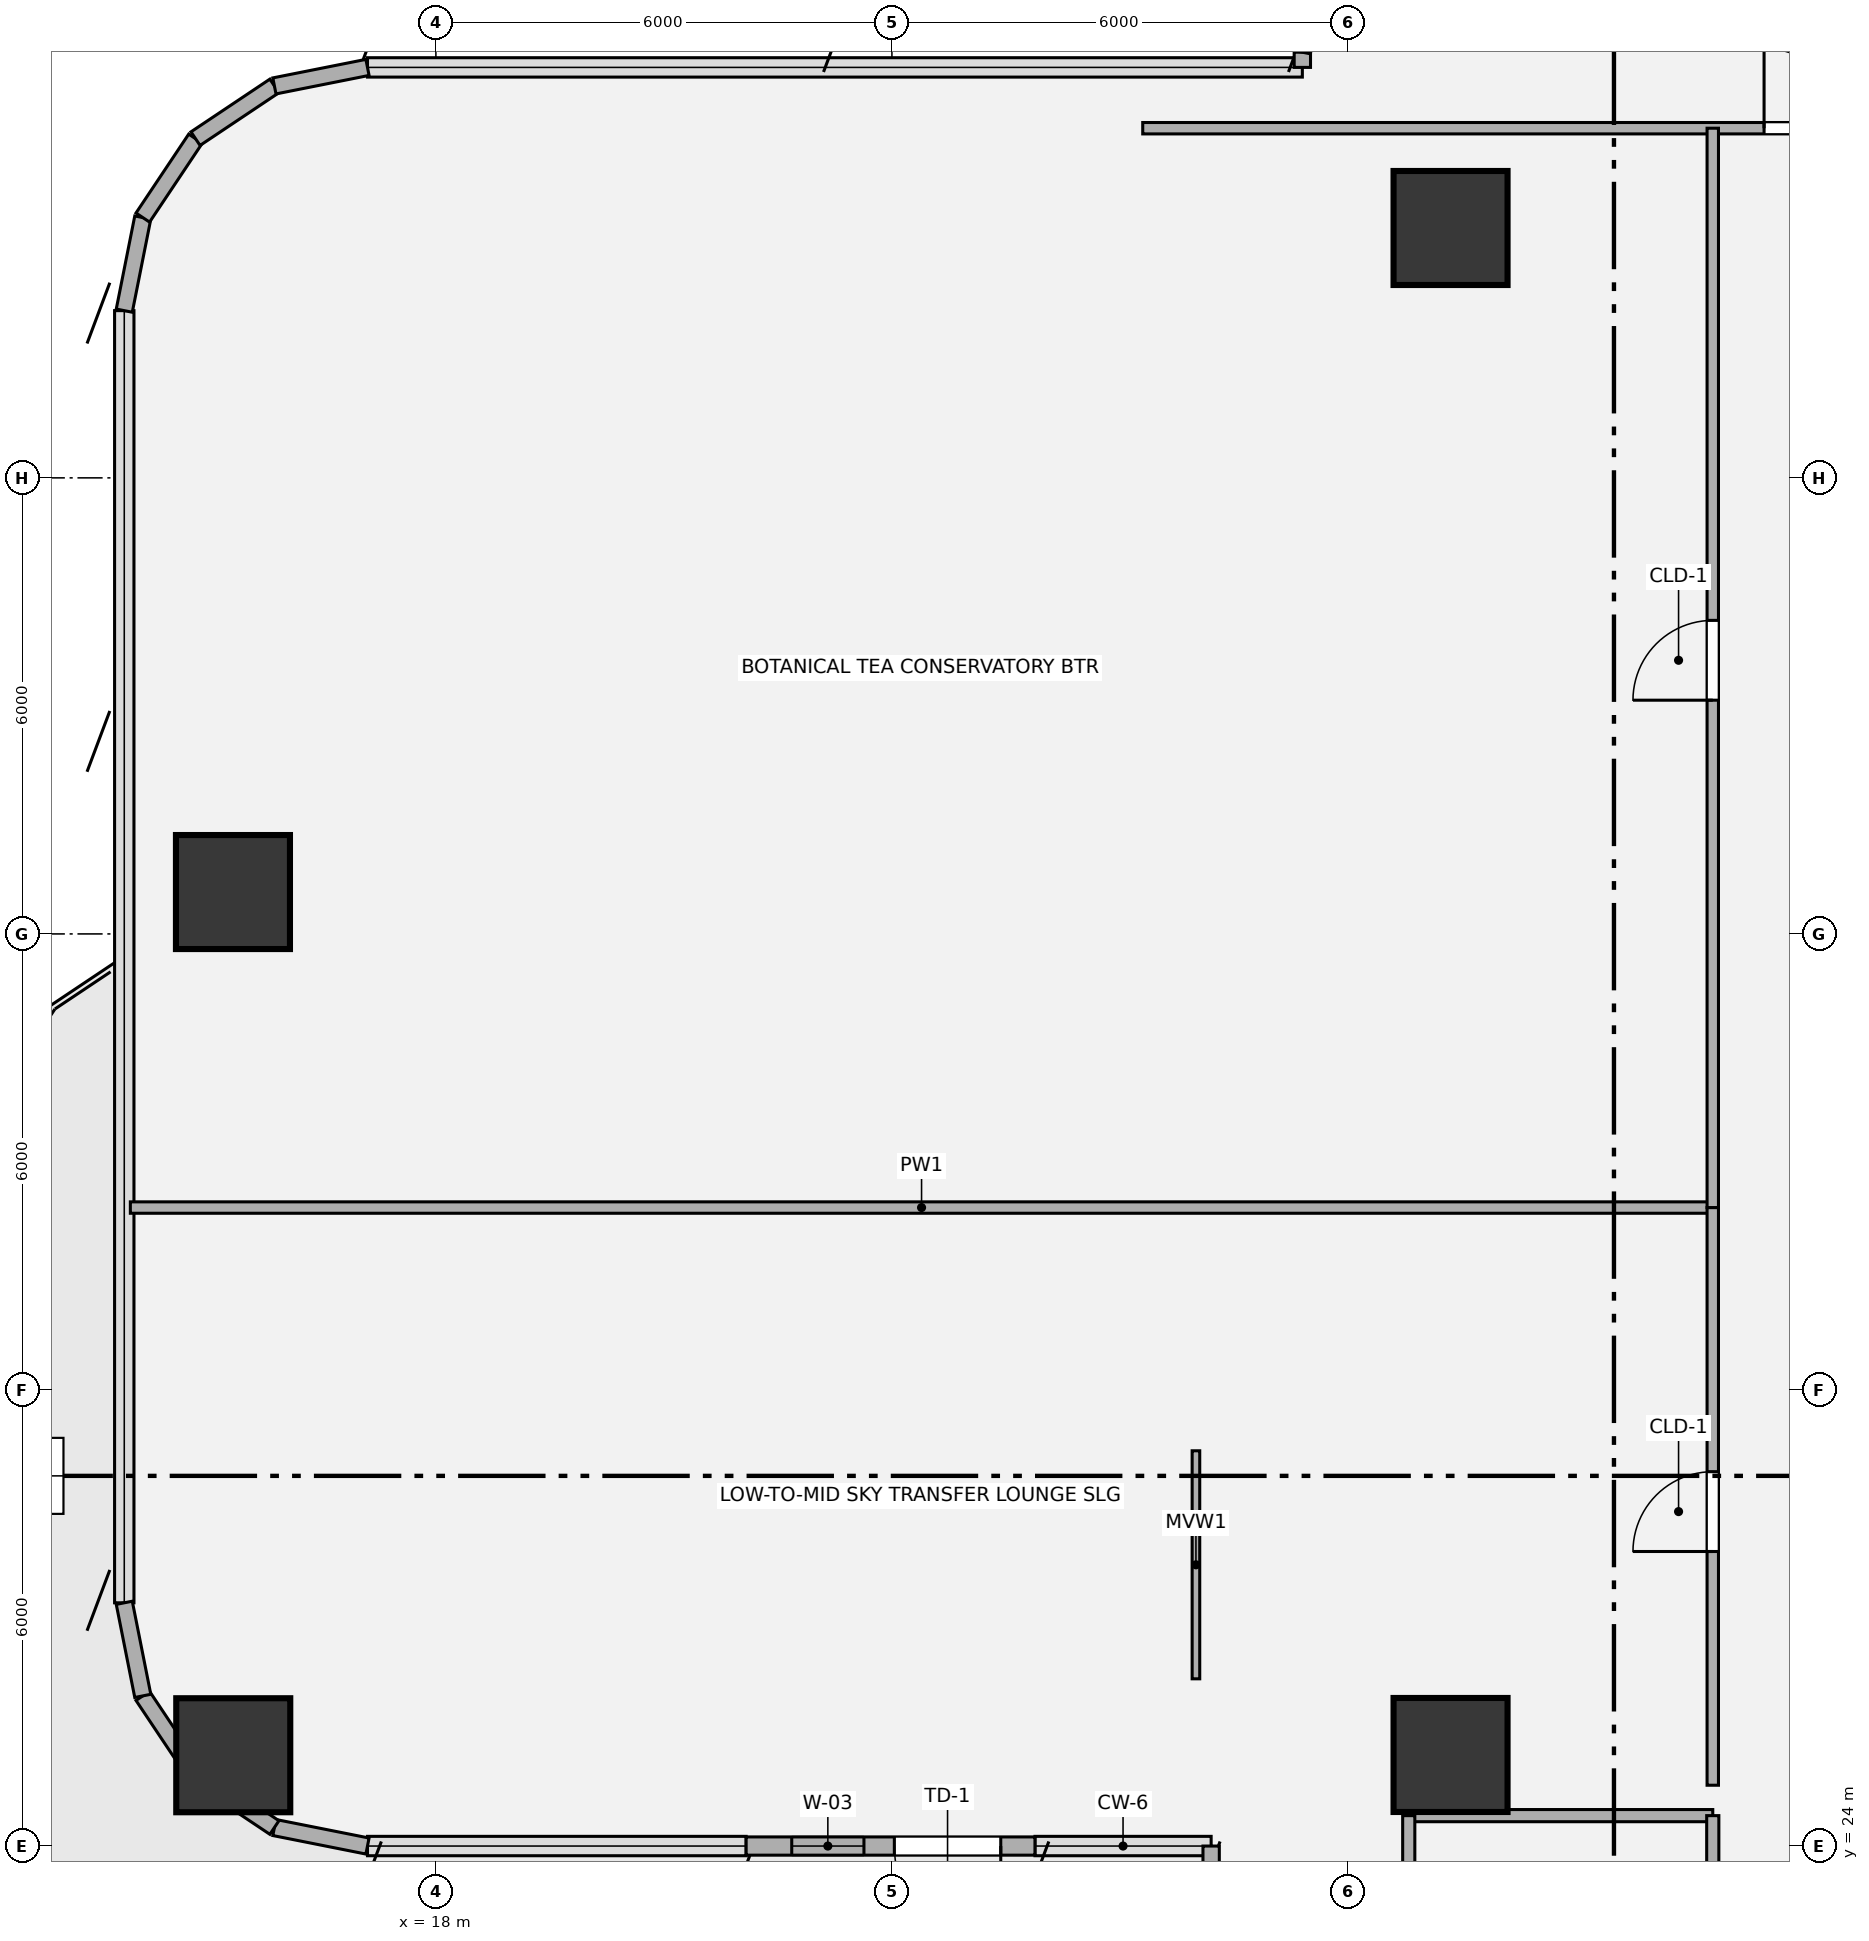
"""IFC4 building model, lengths in metres.
Left out: names, types, materials, properties, quantities, classifications, styles, units other than length and angle.
Written with IfcOpenShell. Run it as: python <this file> out.ifc"""

import sys

from ifc_helpers import new_model, si_unit, direction, frame, frame_2d, origin, origin_2d, place, context, subcontext, project, spatial, rectangle, hollow_circle, extrude, source, transform, mapped, element, fill, save


model = new_model("IFC4")
c1 = context("Model", 3, precision=1e-05, world=origin(), true_north=direction((0.0, 1.0)))
c2 = subcontext(c1, "Body", "Model", "MODEL_VIEW")
j1 = project(units=[si_unit("LENGTHUNIT", "METRE"), si_unit("PLANEANGLEUNIT", "RADIAN")], contexts=[c1])
p1 = place(None, origin())
s1 = spatial("IfcSite", under=j1, at=p1, CompositionType="ELEMENT")
p2 = place(p1, origin())
s2 = spatial("IfcBuilding", under=s1, at=p2, CompositionType="ELEMENT")
p3 = place(p2, frame((0.0, 0.0, 85.32)))
s3 = spatial("IfcBuildingStorey", under=s2, at=p3, CompositionType="ELEMENT", Elevation=85.32)
m1 = source(origin(), c2, "Body", "SweptSolid", [
    extrude(hollow_circle(Radius=0.75, WallThickness=0.05, at=origin_2d()), origin(), (0.0, 0.0, 1.0), 4.532),
])
p4 = place(p3, frame((14.986, 23.877, 0.0), z_axis=(0.153353359402, 0.581256094592, 0.799139599607), x_axis=(-0.966914173201, 0.255101904467, 0.0)))
e1 = element("IfcColumn", 1, at=p4, inside=s3, PredefinedType="COLUMN", context=c2, shape_type="MappedRepresentation", body=[
    mapped(m1, transform((0.0, 0.0, 0.0), x_axis=(1.0, 0.0, 0.0), y_axis=(0.0, 1.0, 0.0), z_axis=(0.0, 0.0, 1.0), scale=1.0)),
])
m2 = source(origin(), c2, "Body", "SweptSolid", [
    extrude(hollow_circle(Radius=0.75, WallThickness=0.05, at=origin_2d()), origin(), (0.0, 0.0, 1.0), 4.746),
])
p5 = place(p3, frame((14.986, 35.032, 0.0), z_axis=(0.144802699262, 0.640166817875, 0.754465786884), x_axis=(-0.975359457824, 0.220621685317, 0.0)))
e2 = element("IfcColumn", 2, at=p5, inside=s3, PredefinedType="COLUMN", context=c2, shape_type="MappedRepresentation", body=[
    mapped(m2, transform((0.0, 0.0, 0.0), x_axis=(1.0, 0.0, 0.0), y_axis=(0.0, 1.0, 0.0), z_axis=(0.0, 0.0, 1.0), scale=1.0)),
])
m3 = source(origin(), c2, "Body", "SweptSolid", [
    extrude(hollow_circle(Radius=0.75, WallThickness=0.05, at=origin_2d()), origin(), (0.0, 0.0, 1.0), 4.491),
])
p6 = place(p3, frame((31.35, 23.877, 0.0), z_axis=(0.0, 0.58821048592, 0.808707873248), x_axis=(-1.0, 0.0, 0.0)))
e3 = element("IfcColumn", 3, at=p6, inside=s3, PredefinedType="COLUMN", context=c2, shape_type="MappedRepresentation", body=[
    mapped(m3, transform((0.0, 0.0, 0.0), x_axis=(1.0, 0.0, 0.0), y_axis=(0.0, 1.0, 0.0), z_axis=(0.0, 0.0, 1.0), scale=1.0)),
])
m4 = source(origin(), c2, "Body", "SweptSolid", [
    extrude(hollow_circle(Radius=0.75, WallThickness=0.05, at=origin_2d()), origin(), (0.0, 0.0, 1.0), 5.348),
])
p7 = place(p3, frame((31.35, 43.268, 0.0), z_axis=(0.0, 0.75502895514, 0.655691449464), x_axis=(-1.0, 0.0, 0.0)))
e4 = element("IfcColumn", 4, at=p7, inside=s3, PredefinedType="COLUMN", context=c2, shape_type="MappedRepresentation", body=[
    mapped(m4, transform((0.0, 0.0, 0.0), x_axis=(1.0, 0.0, 0.0), y_axis=(0.0, 1.0, 0.0), z_axis=(0.0, 0.0, 1.0), scale=1.0)),
])
p8 = place(p3, frame((28.2, 21.4, 0.0), z_axis=(0.0, 0.0, 1.0), x_axis=(0.0, 1.0, 0.0)))
e5 = element("IfcWall", 5, at=p8, inside=s3, PredefinedType="SOLIDWALL", context=c2, shape_type="SweptSolid", body=[
    extrude(rectangle(XDim=2.6, YDim=0.215, at=frame_2d((1.3, 0.0))), origin(), (0.0, 0.0, 1.0), 4.092),
])
p9 = place(p3, frame((25.882, 24.0, 0.0), z_axis=(0.0, 0.0, 1.0), x_axis=(-1.0, 0.0, 0.0)))
e6 = element("IfcWall", 6, at=p9, inside=s3, PredefinedType="SOLIDWALL", context=c2, shape_type="SweptSolid", body=[
    extrude(rectangle(XDim=3.8, YDim=0.24, at=frame_2d((1.9, 0.0))), origin(), (0.0, 0.0, 1.0), 4.092),
])
p10 = place(p9, frame((0.45, 0.0, 0.0)))
e7 = element("IfcOpeningElement", 7, at=p10, cuts=e6, PredefinedType="OPENING", context=c2, shape_type="SweptSolid", body=[
    extrude(rectangle(XDim=1.4, YDim=2.15, at=origin_2d()), frame((0.7, 0.13, 1.075), z_axis=(0.0, -1.0, 0.0), x_axis=(1.0, 0.0, 0.0)), (0.0, 0.0, 1.0), 0.26),
])
p11 = place(p9, frame((2.25, 0.0, 0.85)))
e8 = element("IfcOpeningElement", 8, at=p11, cuts=e6, PredefinedType="OPENING", context=c2, shape_type="SweptSolid", body=[
    extrude(rectangle(XDim=0.95, YDim=1.35, at=origin_2d()), frame((0.475, 0.13, 0.675), z_axis=(0.0, -1.0, 0.0), x_axis=(1.0, 0.0, 0.0)), (0.0, 0.0, 1.0), 0.26),
])
for number, where, z_axis, x_axis in (
    (9, (17.1, 24.0, 0.0), (0.0, 0.0, 1.0), (-0.981, 0.195, 0.0)),
    (10, (15.875, 24.244, 0.0), (0.0, 0.0, 1.0), (-0.831, 0.556, 0.0)),
    (11, (14.837, 24.937, 0.0), (0.0, 0.0, 1.0), (-0.556, 0.831, 0.0)),
    (12, (14.144, 25.975, 0.0), (0.0, 0.0, 1.0), (-0.195, 0.981, 0.0)),
    (13, (13.9, 44.2, 0.0), (0.0, 0.0, 1.0), (0.195, 0.981, 0.0)),
    (14, (14.144, 45.425, 0.0), (0.0, 0.0, 1.0), (0.556, 0.831, 0.0)),
    (15, (14.837, 46.463, 0.0), (0.0, 0.0, 1.0), (0.831, 0.556, 0.0)),
    (16, (15.875, 47.156, 0.0), (0.0, 0.0, 1.0), (0.981, 0.195, 0.0)),
):
    element("IfcWall", number, at=place(p3, frame(where, z_axis=z_axis, x_axis=x_axis)), inside=s3, PredefinedType="SOLIDWALL", context=c2, shape_type="SweptSolid", body=[
        extrude(rectangle(XDim=1.249, YDim=0.215, at=frame_2d((0.624, 0.0))), origin(), (0.0, 0.0, 1.0), 4.092),
    ])
p12 = place(p3, frame((29.4, 47.4, 0.0), z_axis=(0.0, 0.0, 1.0), x_axis=(0.0, 1.0, 0.0)))
e17 = element("IfcWall", 17, at=p12, inside=s3, PredefinedType="SOLIDWALL", context=c2, shape_type="SweptSolid", body=[
    extrude(rectangle(XDim=0.2, YDim=0.215, at=frame_2d((0.1, 0.0))), origin(), (0.0, 0.0, 1.0), 4.092),
])
p13 = place(p3, frame((29.4, 47.6, 0.0), z_axis=(0.0, 0.0, 1.0), x_axis=(0.195127417394, 0.980777900945, 0.0)))
e18 = element("IfcWall", 18, at=p13, inside=s3, PredefinedType="SOLIDWALL", context=c2, shape_type="SweptSolid", body=[
    extrude(rectangle(XDim=1.092, YDim=0.215, at=frame_2d((0.546, 0.0))), origin(), (0.0, 0.0, 1.0), 4.092),
])
p14 = place(p3, frame((30.8, 24.4, 0.0), z_axis=(0.0, 0.0, 1.0), x_axis=(1.0, 0.0, 0.0)))
e19 = element("IfcWall", 19, at=p14, inside=s3, PredefinedType="PLUMBINGWALL", context=c2, shape_type="SweptSolid", body=[
    extrude(rectangle(XDim=4.0, YDim=0.16, at=frame_2d((2.0, 0.0))), origin(), (0.0, 0.0, 1.0), 4.062),
])
p15 = place(p3, frame((13.98, 32.4, 0.0), z_axis=(0.0, 0.0, 1.0), x_axis=(1.0, 0.0, 0.0)))
e20 = element("IfcWall", 20, at=p15, inside=s3, PredefinedType="PARTITIONING", context=c2, shape_type="SweptSolid", body=[
    extrude(rectangle(XDim=20.82, YDim=0.15, at=frame_2d((10.41, 0.0))), origin(), (0.0, 0.0, 1.0), 3.617),
])
p16 = place(p3, frame((27.3, 46.6, 0.0), z_axis=(0.0, 0.0, 1.0), x_axis=(1.0, 0.0, 0.0)))
e21 = element("IfcWall", 21, at=p16, inside=s3, PredefinedType="PARTITIONING", context=c2, shape_type="SweptSolid", body=[
    extrude(rectangle(XDim=17.4, YDim=0.15, at=frame_2d((8.7, 0.0))), origin(), (0.0, 0.0, 1.0), 3.87),
])
p17 = place(p16, frame((8.175, 0.0, 0.0)))
e22 = element("IfcOpeningElement", 22, at=p17, cuts=e21, PredefinedType="OPENING", context=c2, shape_type="SweptSolid", body=[
    extrude(rectangle(XDim=1.05, YDim=2.1, at=origin_2d()), frame((0.525, 0.085, 1.05), z_axis=(0.0, -1.0, 0.0), x_axis=(1.0, 0.0, 0.0)), (0.0, 0.0, 1.0), 0.17),
])
p18 = place(p3, frame((30.8, 20.8, 0.0), z_axis=(0.0, 0.0, 1.0), x_axis=(0.0, 1.0, 0.0)))
e23 = element("IfcWall", 23, at=p18, inside=s3, PredefinedType="PLUMBINGWALL", context=c2, shape_type="SweptSolid", body=[
    extrude(rectangle(XDim=3.6, YDim=0.16, at=frame_2d((1.8, 0.0))), origin(), (0.0, 0.0, 1.0), 2.277),
])
p19 = place(p3, frame((34.8, 20.8, 0.0), z_axis=(0.0, 0.0, 1.0), x_axis=(0.0, 1.0, 0.0)))
e24 = element("IfcWall", 24, at=p19, inside=s3, PredefinedType="PLUMBINGWALL", context=c2, shape_type="SweptSolid", body=[
    extrude(rectangle(XDim=3.6, YDim=0.16, at=frame_2d((1.8, 0.0))), origin(), (0.0, 0.0, 1.0), 4.062),
])
p20 = place(p19, frame((1.37, 0.0, 0.0)))
e25 = element("IfcOpeningElement", 25, at=p20, cuts=e24, PredefinedType="OPENING", context=c2, shape_type="SweptSolid", body=[
    extrude(rectangle(XDim=0.86, YDim=2.1, at=origin_2d()), frame((0.43, 0.09, 1.05), z_axis=(0.0, -1.0, 0.0), x_axis=(1.0, 0.0, 0.0)), (0.0, 0.0, 1.0), 0.18),
])
p21 = place(p3, frame((34.8, 24.8, 0.0), z_axis=(0.0, 0.0, 1.0), x_axis=(0.0, 1.0, 0.0)))
e26 = element("IfcWall", 26, at=p21, inside=s3, PredefinedType="PARTITIONING", context=c2, shape_type="SweptSolid", body=[
    extrude(rectangle(XDim=7.6, YDim=0.15, at=frame_2d((3.8, 0.0))), origin(), (0.0, 0.0, 1.0), 4.062),
])
p22 = place(p21, frame((3.075, 0.0, 0.0)))
e27 = element("IfcOpeningElement", 27, at=p22, cuts=e26, PredefinedType="OPENING", context=c2, shape_type="SweptSolid", body=[
    extrude(rectangle(XDim=1.05, YDim=2.1, at=origin_2d()), frame((0.525, 0.085, 1.05), z_axis=(0.0, -1.0, 0.0), x_axis=(1.0, 0.0, 0.0)), (0.0, 0.0, 1.0), 0.17),
])
p23 = place(p3, frame((34.8, 32.4, 0.0), z_axis=(0.0, 0.0, 1.0), x_axis=(0.0, 1.0, 0.0)))
e28 = element("IfcWall", 28, at=p23, inside=s3, PredefinedType="PARTITIONING", context=c2, shape_type="SweptSolid", body=[
    extrude(rectangle(XDim=14.2, YDim=0.15, at=frame_2d((7.1, 0.0))), origin(), (0.0, 0.0, 1.0), 4.062),
])
p24 = place(p23, frame((6.675, 0.0, 0.0)))
e29 = element("IfcOpeningElement", 29, at=p24, cuts=e28, PredefinedType="OPENING", context=c2, shape_type="SweptSolid", body=[
    extrude(rectangle(XDim=1.05, YDim=2.1, at=origin_2d()), frame((0.525, 0.085, 1.05), z_axis=(0.0, -1.0, 0.0), x_axis=(1.0, 0.0, 0.0)), (0.0, 0.0, 1.0), 0.17),
])
p25 = place(p3, frame((28.0, 26.2, 0.0), z_axis=(0.0, 0.0, 1.0), x_axis=(0.0, 1.0, 0.0)))
e30 = element("IfcWall", 30, at=p25, inside=s3, PredefinedType="MOVABLE", context=c2, shape_type="SweptSolid", body=[
    extrude(rectangle(XDim=3.0, YDim=0.1, at=frame_2d((1.5, 0.0))), origin(), (0.0, 0.0, 1.0), 2.85),
])
m5 = source(origin(), c2, "Body", "SweptSolid", [
    extrude(rectangle(XDim=1.4, YDim=2.15, at=origin_2d()), frame((0.7, 0.025, 1.075), z_axis=(0.0, -1.0, 0.0), x_axis=(1.0, 0.0, 0.0)), (0.0, 0.0, 1.0), 0.05),
])
p26 = place(p10, origin())
e31 = element("IfcDoor", 31, at=p26, inside=s3, OperationType="SINGLE_SWING_LEFT", PredefinedType="DOOR", context=c2, shape_type="MappedRepresentation", body=[
    mapped(m5, transform((0.0, 0.0, 0.0), x_axis=(1.0, 0.0, 0.0), y_axis=(0.0, 1.0, 0.0), z_axis=(0.0, 0.0, 1.0), scale=1.0)),
])
fill(e7, e31)
m6 = source(origin(), c2, "Body", "SweptSolid", [
    extrude(rectangle(XDim=0.95, YDim=1.35, at=origin_2d()), frame((0.475, 0.03, 0.675), z_axis=(0.0, -1.0, 0.0), x_axis=(1.0, 0.0, 0.0)), (0.0, 0.0, 1.0), 0.06),
])
p27 = place(p11, origin())
e32 = element("IfcWindow", 32, at=p27, inside=s3, PartitioningType="SINGLE_PANEL", PredefinedType="WINDOW", context=c2, shape_type="MappedRepresentation", body=[
    mapped(m6, transform((0.0, 0.0, 0.0), x_axis=(1.0, 0.0, 0.0), y_axis=(0.0, 1.0, 0.0), z_axis=(0.0, 0.0, 1.0), scale=1.0)),
])
fill(e8, e32)
m7 = source(origin(), c2, "Body", "SweptSolid", [
    extrude(rectangle(XDim=1.05, YDim=2.1, at=origin_2d()), frame((0.525, 0.025, 1.05), z_axis=(0.0, -1.0, 0.0), x_axis=(1.0, 0.0, 0.0)), (0.0, 0.0, 1.0), 0.05),
])
p28 = place(p17, origin())
e33 = element("IfcDoor", 33, at=p28, inside=s3, OperationType="SINGLE_SWING_LEFT", PredefinedType="DOOR", context=c2, shape_type="MappedRepresentation", body=[
    mapped(m7, transform((0.0, 0.0, 0.0), x_axis=(1.0, 0.0, 0.0), y_axis=(0.0, 1.0, 0.0), z_axis=(0.0, 0.0, 1.0), scale=1.0)),
])
fill(e22, e33)
p29 = place(p22, origin())
e34 = element("IfcDoor", 34, at=p29, inside=s3, OperationType="SINGLE_SWING_LEFT", PredefinedType="DOOR", context=c2, shape_type="MappedRepresentation", body=[
    mapped(m7, transform((0.0, 0.0, 0.0), x_axis=(1.0, 0.0, 0.0), y_axis=(0.0, 1.0, 0.0), z_axis=(0.0, 0.0, 1.0), scale=1.0)),
])
fill(e27, e34)
p30 = place(p24, origin())
e35 = element("IfcDoor", 35, at=p30, inside=s3, OperationType="SINGLE_SWING_LEFT", PredefinedType="DOOR", context=c2, shape_type="MappedRepresentation", body=[
    mapped(m7, transform((0.0, 0.0, 0.0), x_axis=(1.0, 0.0, 0.0), y_axis=(0.0, 1.0, 0.0), z_axis=(0.0, 0.0, 1.0), scale=1.0)),
])
fill(e29, e35)
save(model, sys.argv[1])
